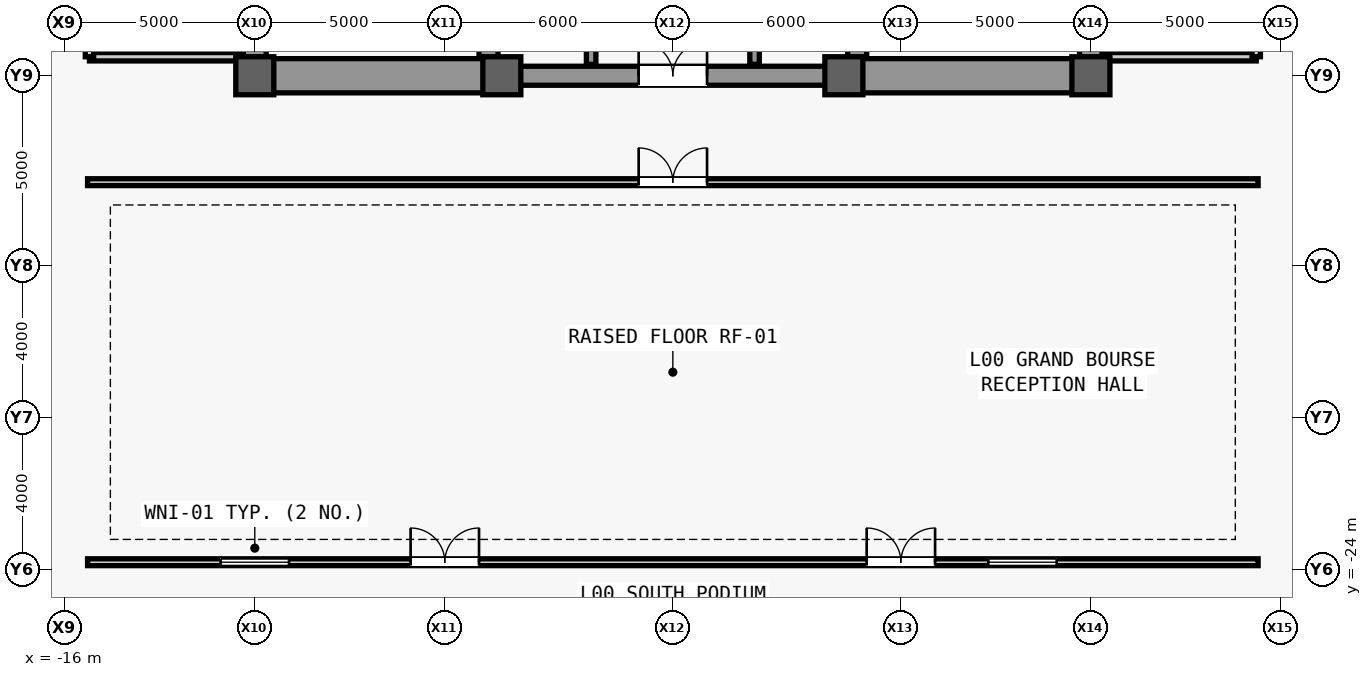
"""IFC4 building model, lengths in metres.
Left out: names, types, materials, properties, quantities, classifications, styles, units other than length and angle.
Written with IfcOpenShell. Run it as: python <this file> out.ifc"""

import sys

from ifc_helpers import new_model, si_unit, direction, frame, frame_2d, origin, origin_2d, place, context, subcontext, project, spatial, rectangle, extrude, source, transform, mapped, element, fill, save


model = new_model("IFC4")
c1 = context("Model", 3, precision=1e-05, world=origin(), true_north=direction((0.0, 1.0)))
c2 = subcontext(c1, "Body", "Model", "MODEL_VIEW")
j1 = project(units=[si_unit("LENGTHUNIT", "METRE"), si_unit("PLANEANGLEUNIT", "RADIAN")], contexts=[c1])
p1 = place(None, origin())
s1 = spatial("IfcSite", under=j1, at=p1, CompositionType="ELEMENT")
p2 = place(p1, origin())
s2 = spatial("IfcBuilding", under=s1, at=p2, CompositionType="ELEMENT")
p3 = place(p2, origin())
s3 = spatial("IfcBuildingStorey", under=s2, at=p3, CompositionType="ELEMENT", Elevation=0.0)
m1 = source(origin(), c2, "Body", "SweptSolid", [
    extrude(rectangle(XDim=22.0, YDim=0.6, at=frame_2d((11.0, 0.0))), origin(), (0.0, 0.0, 1.0), 6.28),
])
p4 = place(p3, frame((-11.0, -11.0, 0.0), z_axis=(0.0, 0.0, 1.0), x_axis=(0.0, 1.0, 0.0)))
e1 = element("IfcWall", 1, at=p4, inside=s3, PredefinedType="SHEAR", context=c2, shape_type="MappedRepresentation", body=[
    mapped(m1, transform((0.0, 0.0, 0.0), scale=1.0)),
])
m2 = source(origin(), c2, "Body", "SweptSolid", [
    extrude(rectangle(XDim=1.1, YDim=2.2, at=frame_2d((0.55, 1.1))), frame((0.0, 0.31, 0.0), z_axis=(0.0, -1.0, 0.0), x_axis=(1.0, 0.0, 0.0)), (0.0, 0.0, 1.0), 0.62),
])
p5 = place(p4, frame((0.8, 0.0, 0.0)))
e2 = element("IfcOpeningElement", 2, at=p5, cuts=e1, PredefinedType="OPENING", context=c2, shape_type="MappedRepresentation", body=[
    mapped(m2, transform((0.0, 0.0, 0.0), scale=1.0)),
])
p6 = place(p4, frame((12.5, 0.0, 0.0)))
e3 = element("IfcOpeningElement", 3, at=p6, cuts=e1, PredefinedType="OPENING", context=c2, shape_type="MappedRepresentation", body=[
    mapped(m2, transform((0.0, 0.0, 0.0), scale=1.0)),
])
m3 = source(origin(), c2, "Body", "SweptSolid", [
    extrude(rectangle(XDim=0.9, YDim=2.15, at=frame_2d((0.45, 1.075))), frame((0.0, 0.31, 0.0), z_axis=(0.0, -1.0, 0.0), x_axis=(1.0, 0.0, 0.0)), (0.0, 0.0, 1.0), 0.62),
])
p7 = place(p4, frame((6.85, 0.0, 0.0)))
e4 = element("IfcOpeningElement", 4, at=p7, cuts=e1, PredefinedType="OPENING", context=c2, shape_type="MappedRepresentation", body=[
    mapped(m3, transform((0.0, 0.0, 0.0), scale=1.0)),
])
m4 = source(origin(), c2, "Body", "SweptSolid", [
    extrude(rectangle(XDim=1.2, YDim=2.3, at=frame_2d((0.6, 1.15))), frame((0.0, 0.31, 0.0), z_axis=(0.0, -1.0, 0.0), x_axis=(1.0, 0.0, 0.0)), (0.0, 0.0, 1.0), 0.62),
])
p8 = place(p4, frame((14.6, 0.0, 0.0)))
e5 = element("IfcOpeningElement", 5, at=p8, cuts=e1, PredefinedType="OPENING", context=c2, shape_type="MappedRepresentation", body=[
    mapped(m4, transform((0.0, 0.0, 0.0), scale=1.0)),
])
p9 = place(p4, frame((18.2, 0.0, 0.0)))
e6 = element("IfcOpeningElement", 6, at=p9, cuts=e1, PredefinedType="OPENING", context=c2, shape_type="MappedRepresentation", body=[
    mapped(m4, transform((0.0, 0.0, 0.0), scale=1.0)),
])
m5 = source(origin(), c2, "Body", "SweptSolid", [
    extrude(rectangle(XDim=1.3, YDim=2.3, at=frame_2d((0.65, 1.15))), frame((0.0, 0.31, 0.0), z_axis=(0.0, -1.0, 0.0), x_axis=(1.0, 0.0, 0.0)), (0.0, 0.0, 1.0), 0.62),
])
p10 = place(p4, frame((2.7, 0.0, 0.0)))
e7 = element("IfcOpeningElement", 7, at=p10, cuts=e1, PredefinedType="OPENING", context=c2, shape_type="MappedRepresentation", body=[
    mapped(m5, transform((0.0, 0.0, 0.0), scale=1.0)),
])
p11 = place(p3, frame((11.0, -11.0, 0.0), z_axis=(0.0, 0.0, 1.0), x_axis=(0.0, 1.0, 0.0)))
e8 = element("IfcWall", 8, at=p11, inside=s3, PredefinedType="SHEAR", context=c2, shape_type="MappedRepresentation", body=[
    mapped(m1, transform((0.0, 0.0, 0.0), scale=1.0)),
])
p12 = place(p11, frame((0.8, 0.0, 0.0)))
e9 = element("IfcOpeningElement", 9, at=p12, cuts=e8, PredefinedType="OPENING", context=c2, shape_type="MappedRepresentation", body=[
    mapped(m2, transform((0.0, 0.0, 0.0), scale=1.0)),
])
p13 = place(p11, frame((6.2, 0.0, 0.0)))
e10 = element("IfcOpeningElement", 10, at=p13, cuts=e8, PredefinedType="OPENING", context=c2, shape_type="MappedRepresentation", body=[
    mapped(m3, transform((0.0, 0.0, 0.0), scale=1.0)),
])
p14 = place(p11, frame((8.05, 0.0, 0.0)))
e11 = element("IfcOpeningElement", 11, at=p14, cuts=e8, PredefinedType="OPENING", context=c2, shape_type="MappedRepresentation", body=[
    mapped(m3, transform((0.0, 0.0, 0.0), scale=1.0)),
])
p15 = place(p11, frame((2.7, 0.0, 0.0)))
e12 = element("IfcOpeningElement", 12, at=p15, cuts=e8, PredefinedType="OPENING", context=c2, shape_type="MappedRepresentation", body=[
    mapped(m5, transform((0.0, 0.0, 0.0), scale=1.0)),
])
p16 = place(p11, frame((13.35, 0.0, 0.0)))
e13 = element("IfcOpeningElement", 13, at=p16, cuts=e8, PredefinedType="OPENING", context=c2, shape_type="MappedRepresentation", body=[
    mapped(m5, transform((0.0, 0.0, 0.0), scale=1.0)),
])
m6 = source(origin(), c2, "Body", "SweptSolid", [
    extrude(rectangle(XDim=21.4, YDim=0.5, at=frame_2d((10.7, 0.0))), origin(), (0.0, 0.0, 1.0), 6.28),
])
for number, where, z_axis, x_axis in (
    (14, (-4.85, -10.7, 0.0), (0.0, 0.0, 1.0), (0.0, 1.0, 0.0)),
    (15, (4.85, -10.7, 0.0), (0.0, 0.0, 1.0), (0.0, 1.0, 0.0)),
):
    element("IfcWall", number, at=place(p3, frame(where, z_axis=z_axis, x_axis=x_axis)), inside=s3, PredefinedType="SHEAR", context=c2, shape_type="MappedRepresentation", body=[
        mapped(m6, transform((0.0, 0.0, 0.0), scale=1.0)),
    ])
m7 = source(origin(), c2, "Body", "SweptSolid", [
    extrude(rectangle(XDim=5.85, YDim=0.9, at=frame_2d((2.925, 0.0))), origin(), (0.0, 0.0, 1.0), 6.28),
])
for number, where, z_axis, x_axis in (
    (16, (-10.7, -11.0, 0.0), (0.0, 0.0, 1.0), (1.0, 0.0, 0.0)),
    (17, (4.85, -11.0, 0.0), (0.0, 0.0, 1.0), (1.0, 0.0, 0.0)),
):
    element("IfcWall", number, at=place(p3, frame(where, z_axis=z_axis, x_axis=x_axis)), inside=s3, PredefinedType="SHEAR", context=c2, shape_type="MappedRepresentation", body=[
        mapped(m7, transform((0.0, 0.0, 0.0), scale=1.0)),
    ])
m8 = source(origin(), c2, "Body", "SweptSolid", [
    extrude(rectangle(XDim=9.2, YDim=0.5, at=frame_2d((4.6, 0.0))), origin(), (0.0, 0.0, 1.0), 6.28),
])
p17 = place(p3, frame((-4.6, -11.0, 0.0), z_axis=(0.0, 0.0, 1.0), x_axis=(1.0, 0.0, 0.0)))
e18 = element("IfcWall", 18, at=p17, inside=s3, PredefinedType="SHEAR", context=c2, shape_type="MappedRepresentation", body=[
    mapped(m8, transform((0.0, 0.0, 0.0), scale=1.0)),
])
m9 = source(origin(), c2, "Body", "SweptSolid", [
    extrude(rectangle(XDim=1.8, YDim=2.25, at=frame_2d((0.9, 1.125))), frame((0.0, 0.26, 0.0), z_axis=(0.0, -1.0, 0.0), x_axis=(1.0, 0.0, 0.0)), (0.0, 0.0, 1.0), 0.52),
])
p18 = place(p17, frame((3.7, 0.0, 0.0)))
e19 = element("IfcOpeningElement", 19, at=p18, cuts=e18, PredefinedType="OPENING", context=c2, shape_type="MappedRepresentation", body=[
    mapped(m9, transform((0.0, 0.0, 0.0), scale=1.0)),
])
m10 = source(origin(), c2, "Body", "SweptSolid", [
    extrude(rectangle(XDim=1.0, YDim=1.0, at=origin_2d()), origin(), (0.0, 0.0, 1.0), 6.6),
])
for number, where, z_axis, x_axis in (
    (20, (-11.0, -11.0, 0.0), (0.0, 0.0, 1.0), (1.0, 0.0, 0.0)),
    (21, (-4.5, -11.0, 0.0), (0.0, 0.0, 1.0), (1.0, 0.0, 0.0)),
    (22, (4.5, -11.0, 0.0), (0.0, 0.0, 1.0), (1.0, 0.0, 0.0)),
    (23, (11.0, -11.0, 0.0), (0.0, 0.0, 1.0), (1.0, 0.0, 0.0)),
):
    element("IfcColumn", number, at=place(p3, frame(where, z_axis=z_axis, x_axis=x_axis)), inside=s3, PredefinedType="COLUMN", context=c2, shape_type="MappedRepresentation", body=[
        mapped(m10, transform((0.0, 0.0, 0.0), scale=1.0)),
    ])
m11 = source(origin(), c2, "Body", "SweptSolid", [
    extrude(rectangle(XDim=4.05, YDim=0.22, at=frame_2d((2.025, 0.0))), origin(), (0.0, 0.0, 1.0), 6.28),
])
p19 = place(p3, frame((-15.35, -10.5, 0.0), z_axis=(0.0, 0.0, 1.0), x_axis=(1.0, 0.0, 0.0)))
e24 = element("IfcWall", 24, at=p19, inside=s3, PredefinedType="PARTITIONING", context=c2, shape_type="MappedRepresentation", body=[
    mapped(m11, transform((0.0, 0.0, 0.0), scale=1.0)),
])
m12 = source(origin(), c2, "Body", "SweptSolid", [
    extrude(rectangle(XDim=4.4, YDim=0.22, at=frame_2d((2.2, 0.0))), origin(), (0.0, 0.0, 1.0), 6.28),
])
p20 = place(p3, frame((-15.35, -10.5, 0.0), z_axis=(0.0, 0.0, 1.0), x_axis=(0.0, 1.0, 0.0)))
e25 = element("IfcWall", 25, at=p20, inside=s3, PredefinedType="PARTITIONING", context=c2, shape_type="MappedRepresentation", body=[
    mapped(m12, transform((0.0, 0.0, 0.0), scale=1.0)),
])
m13 = source(origin(), c2, "Body", "SweptSolid", [
    extrude(rectangle(XDim=1.2, YDim=2.2, at=frame_2d((0.6, 1.1))), frame((0.0, 0.12, 0.0), z_axis=(0.0, -1.0, 0.0), x_axis=(1.0, 0.0, 0.0)), (0.0, 0.0, 1.0), 0.24),
])
p21 = place(p20, frame((1.6, 0.0, 0.0)))
e26 = element("IfcOpeningElement", 26, at=p21, cuts=e25, PredefinedType="OPENING", context=c2, shape_type="MappedRepresentation", body=[
    mapped(m13, transform((0.0, 0.0, 0.0), scale=1.0)),
])
p22 = place(p3, frame((11.3, -10.5, 0.0), z_axis=(0.0, 0.0, 1.0), x_axis=(1.0, 0.0, 0.0)))
e27 = element("IfcWall", 27, at=p22, inside=s3, PredefinedType="PARTITIONING", context=c2, shape_type="MappedRepresentation", body=[
    mapped(m11, transform((0.0, 0.0, 0.0), scale=1.0)),
])
p23 = place(p3, frame((15.35, -10.5, 0.0), z_axis=(0.0, 0.0, 1.0), x_axis=(0.0, 1.0, 0.0)))
e28 = element("IfcWall", 28, at=p23, inside=s3, PredefinedType="PARTITIONING", context=c2, shape_type="MappedRepresentation", body=[
    mapped(m12, transform((0.0, 0.0, 0.0), scale=1.0)),
])
p24 = place(p23, frame((1.6, 0.0, 0.0)))
e29 = element("IfcOpeningElement", 29, at=p24, cuts=e28, PredefinedType="OPENING", context=c2, shape_type="MappedRepresentation", body=[
    mapped(m13, transform((0.0, 0.0, 0.0), scale=1.0)),
])
m14 = source(origin(), c2, "Body", "SweptSolid", [
    extrude(rectangle(XDim=5.4, YDim=0.25, at=frame_2d((2.7, 0.0))), origin(), (0.0, 0.0, 1.0), 6.28),
])
p25 = place(p3, frame((-2.15, -10.7, 0.0), z_axis=(0.0, 0.0, 1.0), x_axis=(0.0, 1.0, 0.0)))
e30 = element("IfcWall", 30, at=p25, inside=s3, PredefinedType="SHEAR", context=c2, shape_type="MappedRepresentation", body=[
    mapped(m14, transform((0.0, 0.0, 0.0), scale=1.0)),
])
m15 = source(origin(), c2, "Body", "SweptSolid", [
    extrude(rectangle(XDim=1.2, YDim=2.3, at=frame_2d((0.6, 1.15))), frame((0.0, 0.135, 0.0), z_axis=(0.0, -1.0, 0.0), x_axis=(1.0, 0.0, 0.0)), (0.0, 0.0, 1.0), 0.27),
])
p26 = place(p25, frame((0.9, 0.0, 0.0)))
e31 = element("IfcOpeningElement", 31, at=p26, cuts=e30, PredefinedType="OPENING", context=c2, shape_type="MappedRepresentation", body=[
    mapped(m15, transform((0.0, 0.0, 0.0), scale=1.0)),
])
p27 = place(p25, frame((3.2, 0.0, 0.0)))
e32 = element("IfcOpeningElement", 32, at=p27, cuts=e30, PredefinedType="OPENING", context=c2, shape_type="MappedRepresentation", body=[
    mapped(m15, transform((0.0, 0.0, 0.0), scale=1.0)),
])
p28 = place(p3, frame((2.15, -10.7, 0.0), z_axis=(0.0, 0.0, 1.0), x_axis=(0.0, 1.0, 0.0)))
e33 = element("IfcWall", 33, at=p28, inside=s3, PredefinedType="SHEAR", context=c2, shape_type="MappedRepresentation", body=[
    mapped(m14, transform((0.0, 0.0, 0.0), scale=1.0)),
])
p29 = place(p28, frame((0.9, 0.0, 0.0)))
e34 = element("IfcOpeningElement", 34, at=p29, cuts=e33, PredefinedType="OPENING", context=c2, shape_type="MappedRepresentation", body=[
    mapped(m15, transform((0.0, 0.0, 0.0), scale=1.0)),
])
p30 = place(p28, frame((3.2, 0.0, 0.0)))
e35 = element("IfcOpeningElement", 35, at=p30, cuts=e33, PredefinedType="OPENING", context=c2, shape_type="MappedRepresentation", body=[
    mapped(m15, transform((0.0, 0.0, 0.0), scale=1.0)),
])
m16 = source(origin(), c2, "Body", "SweptSolid", [
    extrude(rectangle(XDim=30.8, YDim=0.18, at=frame_2d((15.4, 0.0))), origin(), (0.0, 0.0, 1.0), 4.08),
])
p31 = place(p3, frame((-15.4, -23.8, 0.0), z_axis=(0.0, 0.0, 1.0), x_axis=(1.0, 0.0, 0.0)))
e36 = element("IfcWall", 36, at=p31, inside=s3, PredefinedType="PARTITIONING", context=c2, shape_type="MappedRepresentation", body=[
    mapped(m16, transform((0.0, 0.0, 0.0), scale=1.0)),
])
m17 = source(origin(), c2, "Body", "SweptSolid", [
    extrude(rectangle(XDim=1.8, YDim=2.25, at=frame_2d((0.9, 1.125))), frame((0.0, 0.1, 0.0), z_axis=(0.0, -1.0, 0.0), x_axis=(1.0, 0.0, 0.0)), (0.0, 0.0, 1.0), 0.2),
])
p32 = place(p31, frame((8.5, 0.0, 0.0)))
e37 = element("IfcOpeningElement", 37, at=p32, cuts=e36, PredefinedType="OPENING", context=c2, shape_type="MappedRepresentation", body=[
    mapped(m17, transform((0.0, 0.0, 0.0), scale=1.0)),
])
p33 = place(p31, frame((20.5, 0.0, 0.0)))
e38 = element("IfcOpeningElement", 38, at=p33, cuts=e36, PredefinedType="OPENING", context=c2, shape_type="MappedRepresentation", body=[
    mapped(m17, transform((0.0, 0.0, 0.0), scale=1.0)),
])
m18 = source(origin(), c2, "Body", "SweptSolid", [
    extrude(rectangle(XDim=1.8, YDim=1.4, at=frame_2d((0.9, 0.7))), frame((0.0, 0.1, 0.0), z_axis=(0.0, -1.0, 0.0), x_axis=(1.0, 0.0, 0.0)), (0.0, 0.0, 1.0), 0.2),
])
p34 = place(p31, frame((3.5, 0.0, 0.9)))
e39 = element("IfcOpeningElement", 39, at=p34, cuts=e36, PredefinedType="OPENING", context=c2, shape_type="MappedRepresentation", body=[
    mapped(m18, transform((0.0, 0.0, 0.0), scale=1.0)),
])
p35 = place(p31, frame((23.7, 0.0, 0.9)))
e40 = element("IfcOpeningElement", 40, at=p35, cuts=e36, PredefinedType="OPENING", context=c2, shape_type="MappedRepresentation", body=[
    mapped(m18, transform((0.0, 0.0, 0.0), scale=1.0)),
])
m19 = source(origin(), c2, "Body", "SweptSolid", [
    extrude(rectangle(XDim=30.8, YDim=0.18, at=frame_2d((15.4, 0.0))), origin(), (0.0, 0.0, 1.0), 6.28),
])
p36 = place(p3, frame((-15.4, -13.8, 0.0), z_axis=(0.0, 0.0, 1.0), x_axis=(1.0, 0.0, 0.0)))
e41 = element("IfcWall", 41, at=p36, inside=s3, PredefinedType="PARTITIONING", context=c2, shape_type="MappedRepresentation", body=[
    mapped(m19, transform((0.0, 0.0, 0.0), scale=1.0)),
])
p37 = place(p36, frame((14.5, 0.0, 0.0)))
e42 = element("IfcOpeningElement", 42, at=p37, cuts=e41, PredefinedType="OPENING", context=c2, shape_type="MappedRepresentation", body=[
    mapped(m17, transform((0.0, 0.0, 0.0), scale=1.0)),
])
m20 = source(origin(), c2, "Body", "SweptSolid", [
    extrude(rectangle(XDim=1.8, YDim=2.25, at=frame_2d((0.9, 1.125))), frame((0.0, 0.025, 0.0), z_axis=(0.0, -1.0, 0.0), x_axis=(1.0, 0.0, 0.0)), (0.0, 0.0, 1.0), 0.05),
])
p38 = place(p18, origin())
e43 = element("IfcDoor", 43, at=p38, inside=s3, OperationType="SINGLE_SWING_LEFT", PredefinedType="DOOR", context=c2, shape_type="MappedRepresentation", body=[
    mapped(m20, transform((0.0, 0.0, 0.0), scale=1.0)),
])
fill(e19, e43)
p39 = place(p32, origin())
e44 = element("IfcDoor", 44, at=p39, inside=s3, OperationType="SINGLE_SWING_LEFT", PredefinedType="DOOR", context=c2, shape_type="MappedRepresentation", body=[
    mapped(m20, transform((0.0, 0.0, 0.0), scale=1.0)),
])
fill(e37, e44)
p40 = place(p33, origin())
e45 = element("IfcDoor", 45, at=p40, inside=s3, OperationType="SINGLE_SWING_RIGHT", PredefinedType="DOOR", context=c2, shape_type="MappedRepresentation", body=[
    mapped(m20, transform((0.0, 0.0, 0.0), scale=1.0)),
])
fill(e38, e45)
p41 = place(p37, origin())
e46 = element("IfcDoor", 46, at=p41, inside=s3, OperationType="SINGLE_SWING_LEFT", PredefinedType="DOOR", context=c2, shape_type="MappedRepresentation", body=[
    mapped(m20, transform((0.0, 0.0, 0.0), scale=1.0)),
])
fill(e42, e46)
m21 = source(origin(), c2, "Body", "SweptSolid", [
    extrude(rectangle(XDim=1.8, YDim=1.4, at=frame_2d((0.9, 0.7))), frame((0.0, 0.03, 0.0), z_axis=(0.0, -1.0, 0.0), x_axis=(1.0, 0.0, 0.0)), (0.0, 0.0, 1.0), 0.06),
])
p42 = place(p34, origin())
e47 = element("IfcWindow", 47, at=p42, inside=s3, PartitioningType="SINGLE_PANEL", PredefinedType="WINDOW", context=c2, shape_type="MappedRepresentation", body=[
    mapped(m21, transform((0.0, 0.0, 0.0), scale=1.0)),
])
fill(e39, e47)
p43 = place(p35, origin())
e48 = element("IfcWindow", 48, at=p43, inside=s3, PartitioningType="SINGLE_PANEL", PredefinedType="WINDOW", context=c2, shape_type="MappedRepresentation", body=[
    mapped(m21, transform((0.0, 0.0, 0.0), scale=1.0)),
])
fill(e40, e48)
save(model, sys.argv[1])
